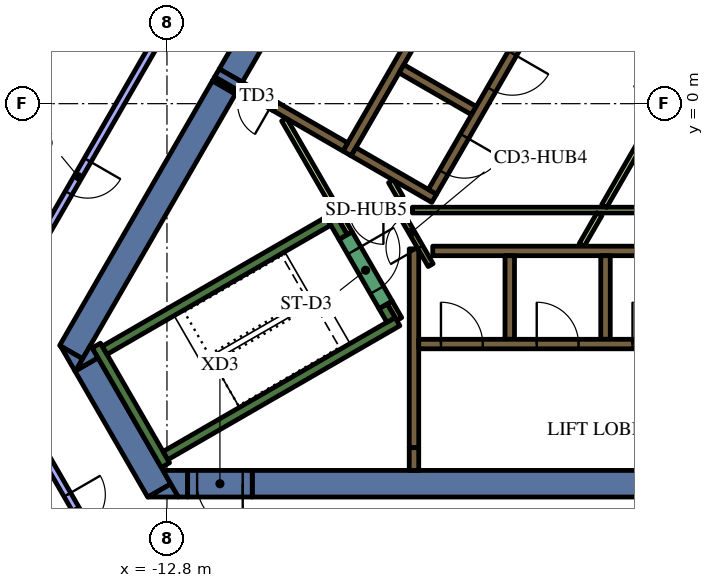
"""IFC4 building model, lengths in metres.
Left out: names, types, materials, properties, quantities, classifications, styles, units other than length and angle.
Written with IfcOpenShell. Run it as: python <this file> out.ifc"""

import sys

from ifc_helpers import new_model, si_unit, direction, frame, frame_2d, origin, place, context, subcontext, project, spatial, polyline, rectangle, outline, extrude, element, fill, save


model = new_model("IFC4")
c1 = context("Model", 3, precision=1e-05, world=origin(), true_north=direction((0.0, 1.0)))
c2 = subcontext(c1, "Body", "Model", "MODEL_VIEW")
j1 = project(units=[si_unit("LENGTHUNIT", "METRE"), si_unit("PLANEANGLEUNIT", "RADIAN")], contexts=[c1])
p1 = place(None, origin())
s1 = spatial("IfcSite", under=j1, at=p1, CompositionType="ELEMENT")
p2 = place(p1, origin())
s2 = spatial("IfcBuilding", under=s1, at=p2, CompositionType="ELEMENT")
p3 = place(p2, frame((0.0, 0.0, 214.2)))
s3 = spatial("IfcBuildingStorey", under=s2, at=p3, CompositionType="ELEMENT", Elevation=214.2)
p4 = place(p3, frame((-11.301, 0.426, 0.0), z_axis=(0.0, 0.0, 1.0), x_axis=(0.50111559984, 0.865380353138, 0.0)))
e1 = element("IfcWall", 1, at=p4, inside=s3, PredefinedType="SOLIDWALL", context=c2, shape_type="SweptSolid", body=[
    extrude(rectangle(XDim=0.121, YDim=0.7, at=frame_2d((0.061, 0.0))), origin(), (0.0, 0.0, 1.0), 4.2),
])
p5 = place(p3, frame((-15.321, -6.537, 0.0), z_axis=(0.0, 0.0, 1.0), x_axis=(0.500000268222, 0.866025248926, 0.0)))
e2 = element("IfcWall", 2, at=p5, inside=s3, PredefinedType="SOLIDWALL", context=c2, shape_type="SweptSolid", body=[
    extrude(rectangle(XDim=8.038, YDim=0.7, at=frame_2d((4.019, 0.0))), origin(), (0.0, 0.0, 1.0), 4.2),
])
p6 = place(p3, origin())
e3 = element("IfcWall", 3, at=p6, inside=s3, PredefinedType="SOLIDWALL", context=c2, shape_type="SweptSolid", body=[
    extrude(outline(polyline([(-15.213, -7.05), (-15.601, -6.378), (-15.019, -6.714), (-15.213, -7.05)])), origin(), (0.0, 0.0, 1.0), 4.2),
])
p7 = place(p3, frame((-4.696, 11.867, 0.0), z_axis=(0.0, 0.0, 1.0), x_axis=(-0.500003726532, -0.866023252259, 0.0)))
e4 = element("IfcWall", 4, at=p7, inside=s3, PredefinedType="SOLIDWALL", context=c2, shape_type="SweptSolid", body=[
    extrude(rectangle(XDim=12.848, YDim=0.7, at=frame_2d((6.424, 0.0))), origin(), (0.0, 0.0, 1.0), 4.2),
])
e5 = element("IfcWall", 5, at=p6, inside=s3, PredefinedType="SOLIDWALL", context=c2, shape_type="SweptSolid", body=[
    extrude(outline(polyline([(-11.543, 0.708), (-11.424, 0.914), (-10.843, 0.578), (-10.962, 0.372), (-11.543, 0.708)])), origin(), (0.0, 0.0, 1.0), 4.2),
])
p8 = place(p3, frame((-14.917, -6.863, 0.0), z_axis=(0.0, 0.0, 1.0), x_axis=(0.499972675833, -0.866041178825, 0.0)))
e6 = element("IfcWall", 6, at=p8, inside=s3, PredefinedType="SOLIDWALL", context=c2, shape_type="SweptSolid", body=[
    extrude(rectangle(XDim=3.829, YDim=0.7, at=frame_2d((1.915, 0.0))), origin(), (0.0, 0.0, 1.0), 4.2),
])
e7 = element("IfcWall", 7, at=p6, inside=s3, PredefinedType="SOLIDWALL", context=c2, shape_type="SweptSolid", body=[
    extrude(outline(polyline([(-14.809, -6.35), (-14.615, -6.686), (-15.197, -7.022), (-14.809, -6.35)])), origin(), (0.0, 0.0, 1.0), 4.2),
])
e8 = element("IfcWall", 8, at=p6, inside=s3, PredefinedType="SOLIDWALL", context=c2, shape_type="SweptSolid", body=[
    extrude(outline(polyline([(-12.5, -10.35), (-13.296, -10.35), (-12.698, -10.005), (-12.5, -10.35)])), origin(), (0.0, 0.0, 1.0), 4.2),
])
e9 = element("IfcWall", 9, at=p6, inside=s3, PredefinedType="SOLIDWALL", context=c2, shape_type="SweptSolid", body=[
    extrude(outline(polyline([(-12.257, -10.35), (-12.5, -10.35), (-12.904, -9.65), (-12.257, -9.65), (-12.257, -10.35)])), origin(), (0.0, 0.0, 1.0), 4.2),
])
p9 = place(p3, frame((-10.556, -10.0, 0.0), z_axis=(0.0, 0.0, 1.0), x_axis=(1.0, 0.0, 0.0)))
e10 = element("IfcWall", 10, at=p9, inside=s3, PredefinedType="SOLIDWALL", context=c2, shape_type="SweptSolid", body=[
    extrude(rectangle(XDim=19.461, YDim=0.7, at=frame_2d((9.73, 0.0))), origin(), (0.0, 0.0, 1.0), 4.2),
])
p10 = place(p3, frame((-12.84, -9.511, 0.0), z_axis=(0.0, 0.0, 1.0), x_axis=(-0.500048121057, 0.865997619297, 0.0)))
e11 = element("IfcWall", 11, at=p10, inside=s3, PredefinedType="SOLIDWALL", context=c2, shape_type="SweptSolid", body=[
    extrude(rectangle(XDim=3.634, YDim=0.25, at=frame_2d((1.817, 0.0))), origin(), (0.0, 0.0, 1.0), 4.2),
])
p11 = place(p3, frame((-14.44, -6.49, 0.0), z_axis=(0.0, 0.0, 1.0), x_axis=(0.866022966069, 0.500004222222, 0.0)))
e12 = element("IfcWall", 12, at=p11, inside=s3, PredefinedType="SOLIDWALL", context=c2, shape_type="SweptSolid", body=[
    extrude(rectangle(XDim=6.8, YDim=0.25, at=frame_2d((3.4, 0.0))), origin(), (0.0, 0.0, 1.0), 4.2),
])
p12 = place(p3, frame((-8.163, -3.511, 0.0), z_axis=(0.0, 0.0, 1.0), x_axis=(-0.499994068514, 0.866028828302, 0.0)))
e13 = element("IfcWall", 13, at=p12, inside=s3, PredefinedType="SOLIDWALL", context=c2, shape_type="SweptSolid", body=[
    extrude(rectangle(XDim=0.674, YDim=0.25, at=frame_2d((0.337, 0.0))), origin(), (0.0, 0.0, 1.0), 4.2),
])
p13 = place(p3, frame((-12.84, -9.261, 0.0), z_axis=(0.0, 0.0, 1.0), x_axis=(0.866016039709, 0.500016218704, 0.0)))
e14 = element("IfcWall", 14, at=p13, inside=s3, PredefinedType="SOLIDWALL", context=c2, shape_type="SweptSolid", body=[
    extrude(rectangle(XDim=7.05, YDim=0.25, at=frame_2d((3.525, 0.0))), origin(), (0.0, 0.0, 1.0), 4.2),
])
p14 = place(p3, frame((-6.905, -5.69, 0.0), z_axis=(0.0, 0.0, 1.0), x_axis=(-0.499993700073, 0.866029041019, 0.0)))
e15 = element("IfcWall", 15, at=p14, inside=s3, PredefinedType="SOLIDWALL", context=c2, shape_type="SweptSolid", body=[
    extrude(rectangle(XDim=0.416, YDim=0.25, at=frame_2d((0.208, 0.0))), origin(), (0.0, 0.0, 1.0), 4.2),
])
p15 = place(p3, frame((-6.3, -9.05, 0.0), z_axis=(0.0, 0.0, 1.0), x_axis=(0.0, 1.0, 0.0)))
e16 = element("IfcWall", 16, at=p15, inside=s3, PredefinedType="SOLIDWALL", context=c2, shape_type="SweptSolid", body=[
    extrude(rectangle(XDim=5.23, YDim=0.25, at=frame_2d((2.615, 0.0))), origin(), (0.0, 0.0, 1.0), 4.2),
])
p16 = place(p3, frame((-6.3, -9.052, 0.0), z_axis=(0.0, 0.0, 1.0), x_axis=(0.0, -1.0, 0.0)))
e17 = element("IfcWall", 17, at=p16, inside=s3, PredefinedType="SOLIDWALL", context=c2, shape_type="SweptSolid", body=[
    extrude(rectangle(XDim=0.598, YDim=0.25, at=frame_2d((0.299, 0.0))), origin(), (0.0, 0.0, 1.0), 4.2),
])
p17 = place(p3, frame((-5.806, -3.875, 0.0), z_axis=(0.0, 0.0, 1.0), x_axis=(1.0, 0.0, 0.0)))
e18 = element("IfcWall", 18, at=p17, inside=s3, PredefinedType="SOLIDWALL", context=c2, shape_type="SweptSolid", body=[
    extrude(rectangle(XDim=12.231, YDim=0.25, at=frame_2d((6.116, 0.0))), origin(), (0.0, 0.0, 1.0), 4.2),
])
for number, where, z_axis, x_axis in (
    (19, (-1.26, -4.0, 0.0), (0.0, 0.0, 1.0), (0.0, -1.0, 0.0)),
    (20, (-3.78, -4.0, 0.0), (0.0, 0.0, 1.0), (0.0, -1.0, 0.0)),
):
    element("IfcWall", number, at=place(p3, frame(where, z_axis=z_axis, x_axis=x_axis)), inside=s3, PredefinedType="SOLIDWALL", context=c2, shape_type="SweptSolid", body=[
        extrude(rectangle(XDim=2.2, YDim=0.25, at=frame_2d((1.1, 0.0))), origin(), (0.0, 0.0, 1.0), 4.2),
    ])
p18 = place(p3, frame((-8.06, -1.311, 0.0), z_axis=(0.0, 0.0, 1.0), x_axis=(0.50000273126, 0.866023826885, 0.0)))
e21 = element("IfcWall", 21, at=p18, inside=s3, PredefinedType="SOLIDWALL", context=c2, shape_type="SweptSolid", body=[
    extrude(rectangle(XDim=10.33, YDim=0.25, at=frame_2d((5.165, 0.0))), origin(), (0.0, 0.0, 1.0), 4.2),
])
p19 = place(p3, frame((-4.724, -0.182, 0.0), z_axis=(0.0, 0.0, 1.0), x_axis=(-0.866008176907, 0.50002983664, 0.0)))
e22 = element("IfcWall", 22, at=p19, inside=s3, PredefinedType="SOLIDWALL", context=c2, shape_type="SweptSolid", body=[
    extrude(rectangle(XDim=2.2, YDim=0.25, at=frame_2d((1.1, 0.0))), origin(), (0.0, 0.0, 1.0), 4.2),
])
p20 = place(p3, frame((-7.889, -1.265, 0.0), z_axis=(0.0, 0.0, 1.0), x_axis=(0.866057815567, -0.499943856944, 0.0)))
e23 = element("IfcWall", 23, at=p20, inside=s3, PredefinedType="SOLIDWALL", context=c2, shape_type="SweptSolid", body=[
    extrude(rectangle(XDim=2.45, YDim=0.25, at=frame_2d((1.225, 0.0))), origin(), (0.0, 0.0, 1.0), 4.2),
])
p21 = place(p3, frame((-9.95, -0.075, 0.0), z_axis=(0.0, 0.0, 1.0), x_axis=(0.865962177421, -0.500109495288, 0.0)))
e24 = element("IfcWall", 24, at=p21, inside=s3, PredefinedType="SOLIDWALL", context=c2, shape_type="SweptSolid", body=[
    extrude(rectangle(XDim=2.129, YDim=0.25, at=frame_2d((1.065, 0.0))), origin(), (0.0, 0.0, 1.0), 4.2),
])
p22 = place(p3, frame((-9.718, -0.417, 0.0), z_axis=(0.0, 0.0, 1.0), x_axis=(0.499966538646, -0.866044721844, 0.0)))
e25 = element("IfcWall", 25, at=p22, inside=s3, PredefinedType="PARTITIONING", context=c2, shape_type="SweptSolid", body=[
    extrude(rectangle(XDim=2.511, YDim=0.15, at=frame_2d((1.255, 0.0))), origin(), (0.0, 0.0, 1.0), 3.45),
])
p23 = place(p3, frame((1.438, -2.8, 0.0), z_axis=(0.0, 0.0, 1.0), x_axis=(-1.0, 0.0, 0.0)))
e26 = element("IfcWall", 26, at=p23, inside=s3, PredefinedType="PARTITIONING", context=c2, shape_type="SweptSolid", body=[
    extrude(rectangle(XDim=7.781, YDim=0.15, at=frame_2d((3.891, 0.0))), origin(), (0.0, 0.0, 1.0), 3.45),
])
p24 = place(p3, frame((-1.418, -2.907, 0.0), z_axis=(0.0, 0.0, 1.0), x_axis=(-0.499978056798, -0.866038072327, 0.0)))
e27 = element("IfcWall", 27, at=p24, inside=s3, PredefinedType="PARTITIONING", context=c2, shape_type="SweptSolid", body=[
    extrude(rectangle(XDim=0.937, YDim=0.15, at=frame_2d((0.469, 0.0))), origin(), (0.0, 0.0, 1.0), 3.45),
])
p25 = place(p3, frame((-1.295, -2.693, 0.0), z_axis=(0.0, 0.0, 1.0), x_axis=(0.500030943131, 0.866007538022, 0.0)))
e28 = element("IfcWall", 28, at=p25, inside=s3, PredefinedType="PARTITIONING", context=c2, shape_type="SweptSolid", body=[
    extrude(rectangle(XDim=2.672, YDim=0.15, at=frame_2d((1.336, 0.0))), origin(), (0.0, 0.0, 1.0), 3.45),
])
p26 = place(p3, frame((-6.653, -2.477, 0.0), z_axis=(0.0, 0.0, 1.0), x_axis=(-0.500002592159, 0.866023907196, 0.0)))
e29 = element("IfcWall", 29, at=p26, inside=s3, PredefinedType="PARTITIONING", context=c2, shape_type="SweptSolid", body=[
    extrude(rectangle(XDim=0.503, YDim=0.15, at=frame_2d((0.251, 0.0))), origin(), (0.0, 0.0, 1.0), 3.45),
])
p27 = place(p3, frame((-7.99, -3.412, 0.0), z_axis=(0.0, 0.0, 1.0), x_axis=(-0.499858525911, 0.866107068482, 0.0)))
e30 = element("IfcWall", 30, at=p27, inside=s3, PredefinedType="PARTITIONING", context=c2, shape_type="SweptSolid", body=[
    extrude(rectangle(XDim=0.466, YDim=0.15, at=frame_2d((0.233, 0.0))), origin(), (0.0, 0.0, 1.0), 3.45),
])
p28 = place(p3, frame((-6.94, -5.23, 0.0), z_axis=(0.0, 0.0, 1.0), x_axis=(0.499834152157, -0.86612113491, 0.0)))
e31 = element("IfcWall", 31, at=p28, inside=s3, PredefinedType="PARTITIONING", context=c2, shape_type="SweptSolid", body=[
    extrude(rectangle(XDim=0.505, YDim=0.15, at=frame_2d((0.252, 0.0))), origin(), (0.0, 0.0, 1.0), 4.2),
])
p29 = place(p3, frame((-6.175, -6.325, 0.0), z_axis=(0.0, 0.0, 1.0), x_axis=(1.0, 0.0, 0.0)))
e32 = element("IfcWall", 32, at=p29, inside=s3, PredefinedType="SOLIDWALL", context=c2, shape_type="SweptSolid", body=[
    extrude(rectangle(XDim=12.35, YDim=0.25, at=frame_2d((6.175, 0.0))), origin(), (0.0, 0.0, 1.0), 4.2),
])
p30 = place(p29, frame((0.585, 0.0, 0.0)))
e33 = element("IfcOpeningElement", 33, at=p30, cuts=e32, PredefinedType="OPENING", context=c2, shape_type="SweptSolid", body=[
    extrude(rectangle(XDim=1.1, YDim=2.1, at=frame_2d((0.55, 1.05))), frame((0.0, 0.135, 0.0), z_axis=(0.0, -1.0, 0.0), x_axis=(1.0, 0.0, 0.0)), (0.0, 0.0, 1.0), 0.27),
])
p31 = place(p29, frame((3.105, 0.0, 0.0)))
e34 = element("IfcOpeningElement", 34, at=p31, cuts=e32, PredefinedType="OPENING", context=c2, shape_type="SweptSolid", body=[
    extrude(rectangle(XDim=1.1, YDim=2.1, at=frame_2d((0.55, 1.05))), frame((0.0, 0.135, 0.0), z_axis=(0.0, -1.0, 0.0), x_axis=(1.0, 0.0, 0.0)), (0.0, 0.0, 1.0), 0.27),
])
p32 = place(p29, frame((5.625, 0.0, 0.0)))
e35 = element("IfcOpeningElement", 35, at=p32, cuts=e32, PredefinedType="OPENING", context=c2, shape_type="SweptSolid", body=[
    extrude(rectangle(XDim=1.1, YDim=2.1, at=frame_2d((0.55, 1.05))), frame((0.0, 0.135, 0.0), z_axis=(0.0, -1.0, 0.0), x_axis=(1.0, 0.0, 0.0)), (0.0, 0.0, 1.0), 0.27),
])
p33 = place(p29, frame((8.145, 0.0, 0.0)))
e36 = element("IfcOpeningElement", 36, at=p33, cuts=e32, PredefinedType="OPENING", context=c2, shape_type="SweptSolid", body=[
    extrude(rectangle(XDim=1.1, YDim=2.1, at=frame_2d((0.55, 1.05))), frame((0.0, 0.135, 0.0), z_axis=(0.0, -1.0, 0.0), x_axis=(1.0, 0.0, 0.0)), (0.0, 0.0, 1.0), 0.27),
])
p34 = place(p29, frame((10.665, 0.0, 0.0)))
e37 = element("IfcOpeningElement", 37, at=p34, cuts=e32, PredefinedType="OPENING", context=c2, shape_type="SweptSolid", body=[
    extrude(rectangle(XDim=1.1, YDim=2.1, at=frame_2d((0.55, 1.05))), frame((0.0, 0.135, 0.0), z_axis=(0.0, -1.0, 0.0), x_axis=(1.0, 0.0, 0.0)), (0.0, 0.0, 1.0), 0.27),
])
p35 = place(p3, frame((-0.898, 6.194, 0.0), z_axis=(0.0, 0.0, 1.0), x_axis=(-0.499996202215, -0.866027596426, 0.0)))
e38 = element("IfcWall", 38, at=p35, inside=s3, PredefinedType="SOLIDWALL", context=c2, shape_type="SweptSolid", body=[
    extrude(rectangle(XDim=9.83, YDim=0.25, at=frame_2d((4.915, 0.0))), origin(), (0.0, 0.0, 1.0), 4.2),
])
p36 = place(p35, frame((0.585, 0.0, 0.0)))
e39 = element("IfcOpeningElement", 39, at=p36, cuts=e38, PredefinedType="OPENING", context=c2, shape_type="SweptSolid", body=[
    extrude(rectangle(XDim=1.1, YDim=2.1, at=frame_2d((0.55, 1.05))), frame((0.0, 0.135, 0.0), z_axis=(0.0, -1.0, 0.0), x_axis=(1.0, 0.0, 0.0)), (0.0, 0.0, 1.0), 0.27),
])
p37 = place(p35, frame((3.105, 0.0, 0.0)))
e40 = element("IfcOpeningElement", 40, at=p37, cuts=e38, PredefinedType="OPENING", context=c2, shape_type="SweptSolid", body=[
    extrude(rectangle(XDim=1.1, YDim=2.1, at=frame_2d((0.55, 1.05))), frame((0.0, 0.135, 0.0), z_axis=(0.0, -1.0, 0.0), x_axis=(1.0, 0.0, 0.0)), (0.0, 0.0, 1.0), 0.27),
])
p38 = place(p35, frame((5.625, 0.0, 0.0)))
e41 = element("IfcOpeningElement", 41, at=p38, cuts=e38, PredefinedType="OPENING", context=c2, shape_type="SweptSolid", body=[
    extrude(rectangle(XDim=1.1, YDim=2.1, at=frame_2d((0.55, 1.05))), frame((0.0, 0.135, 0.0), z_axis=(0.0, -1.0, 0.0), x_axis=(1.0, 0.0, 0.0)), (0.0, 0.0, 1.0), 0.27),
])
p39 = place(p35, frame((8.145, 0.0, 0.0)))
e42 = element("IfcOpeningElement", 42, at=p39, cuts=e38, PredefinedType="OPENING", context=c2, shape_type="SweptSolid", body=[
    extrude(rectangle(XDim=1.1, YDim=2.1, at=frame_2d((0.55, 1.05))), frame((0.0, 0.135, 0.0), z_axis=(0.0, -1.0, 0.0), x_axis=(1.0, 0.0, 0.0)), (0.0, 0.0, 1.0), 0.27),
])
p40 = place(p3, frame((-8.098, -3.474, 0.0), z_axis=(0.0, 0.0, 1.0), x_axis=(0.49994051562, -0.866059744384, 0.0)))
e43 = element("IfcWall", 43, at=p40, inside=s3, PredefinedType="SOLIDWALL", context=c2, shape_type="SweptSolid", body=[
    extrude(rectangle(XDim=2.1, YDim=0.4, at=frame_2d((1.05, 0.0))), origin(), (0.0, 0.0, 1.0), 4.2),
])
p41 = place(p40, frame((0.45, 0.0, 0.0)))
e44 = element("IfcOpeningElement", 44, at=p41, cuts=e43, PredefinedType="OPENING", context=c2, shape_type="SweptSolid", body=[
    extrude(rectangle(XDim=1.2, YDim=2.1, at=frame_2d((0.6, 1.05))), frame((0.0, 0.21, 0.0), z_axis=(0.0, -1.0, 0.0), x_axis=(1.0, 0.0, 0.0)), (0.0, 0.0, 1.0), 0.42),
])
p42 = place(p3, frame((-5.861, -4.248, 0.0), z_axis=(0.0, 0.0, 1.0), x_axis=(-0.500043646338, 0.866000203093, 0.0)))
e45 = element("IfcWall", 45, at=p42, inside=s3, PredefinedType="PARTITIONING", context=c2, shape_type="SweptSolid", body=[
    extrude(rectangle(XDim=1.93, YDim=0.15, at=frame_2d((0.965, 0.0))), origin(), (0.0, 0.0, 1.0), 4.2),
])
p43 = place(p42, frame((0.55, 0.0, 0.0)))
e46 = element("IfcOpeningElement", 46, at=p43, cuts=e45, PredefinedType="OPENING", context=c2, shape_type="SweptSolid", body=[
    extrude(rectangle(XDim=0.9, YDim=2.1, at=frame_2d((0.45, 1.05))), frame((0.0, 0.085, 0.0), z_axis=(0.0, -1.0, 0.0), x_axis=(1.0, 0.0, 0.0)), (0.0, 0.0, 1.0), 0.17),
])
p44 = place(p3, frame((-10.556, -10.0, 0.0), z_axis=(0.0, 0.0, 1.0), x_axis=(-1.0, 0.0, 0.0)))
e47 = element("IfcWall", 47, at=p44, inside=s3, PredefinedType="SOLIDWALL", context=c2, shape_type="SweptSolid", body=[
    extrude(rectangle(XDim=1.7, YDim=0.7, at=frame_2d((0.85, 0.0))), origin(), (0.0, 0.0, 1.0), 4.2),
])
p45 = place(p44, frame((0.25, 0.0, 0.0)))
e48 = element("IfcOpeningElement", 48, at=p45, cuts=e47, PredefinedType="OPENING", context=c2, shape_type="SweptSolid", body=[
    extrude(rectangle(XDim=1.2, YDim=2.1, at=frame_2d((0.6, 1.05))), frame((0.0, 0.36, 0.0), z_axis=(0.0, -1.0, 0.0), x_axis=(1.0, 0.0, 0.0)), (0.0, 0.0, 1.0), 0.72),
])
p46 = place(p3, frame((-6.655, -2.8, 0.0), z_axis=(0.0, 0.0, 1.0), x_axis=(-1.0, 0.0, 0.0)))
e49 = element("IfcWall", 49, at=p46, inside=s3, PredefinedType="PARTITIONING", context=c2, shape_type="SweptSolid", body=[
    extrude(rectangle(XDim=1.8, YDim=0.15, at=frame_2d((0.9, 0.0))), origin(), (0.0, 0.0, 1.0), 3.45),
])
p47 = place(p46, frame((0.45, 0.0, 0.0)))
e50 = element("IfcOpeningElement", 50, at=p47, cuts=e49, PredefinedType="OPENING", context=c2, shape_type="SweptSolid", body=[
    extrude(rectangle(XDim=0.9, YDim=2.1, at=frame_2d((0.45, 1.05))), frame((0.0, 0.085, 0.0), z_axis=(0.0, -1.0, 0.0), x_axis=(1.0, 0.0, 0.0)), (0.0, 0.0, 1.0), 0.17),
])
p48 = place(p3, frame((-9.95, -0.075, 0.0), z_axis=(0.0, 0.0, 1.0), x_axis=(-0.865952669392, 0.500125958508, 0.0)))
e51 = element("IfcWall", 51, at=p48, inside=s3, PredefinedType="SOLIDWALL", context=c2, shape_type="SweptSolid", body=[
    extrude(rectangle(XDim=1.1, YDim=0.25, at=frame_2d((0.55, 0.0))), origin(), (0.0, 0.0, 1.0), 4.2),
])
p49 = place(p48, frame((0.1, 0.0, 0.0)))
e52 = element("IfcOpeningElement", 52, at=p49, cuts=e51, PredefinedType="OPENING", context=c2, shape_type="SweptSolid", body=[
    extrude(rectangle(XDim=0.9, YDim=2.1, at=frame_2d((0.45, 1.05))), frame((0.0, 0.135, 0.0), z_axis=(0.0, -1.0, 0.0), x_axis=(1.0, 0.0, 0.0)), (0.0, 0.0, 1.0), 0.27),
])
p50 = place(p3, frame((-12.537, 2.585, 0.0), z_axis=(0.0, 0.0, 1.0), x_axis=(-0.500002393198, -0.866024022066, 0.0)))
e53 = element("IfcWall", 53, at=p50, inside=s3, PredefinedType="PARTITIONING", context=c2, shape_type="SweptSolid", body=[
    extrude(rectangle(XDim=10.317, YDim=0.2, at=frame_2d((5.159, 0.0))), origin(), (0.0, 0.0, 1.0), 3.45),
])
p51 = place(p50, frame((4.7, 0.0, 0.0)))
e54 = element("IfcOpeningElement", 54, at=p51, cuts=e53, PredefinedType="OPENING", context=c2, shape_type="SweptSolid", body=[
    extrude(rectangle(XDim=1.0, YDim=2.1, at=frame_2d((0.5, 1.05))), frame((0.0, 0.11, 0.0), z_axis=(0.0, -1.0, 0.0), x_axis=(1.0, 0.0, 0.0)), (0.0, 0.0, 1.0), 0.22),
])
p52 = place(p3, frame((-15.971, -9.337, 0.0), z_axis=(0.0, 0.0, 1.0), x_axis=(0.500010870188, -0.866019127788, 0.0)))
e55 = element("IfcWall", 55, at=p52, inside=s3, PredefinedType="PARTITIONING", context=c2, shape_type="SweptSolid", body=[
    extrude(rectangle(XDim=3.249, YDim=0.2, at=frame_2d((1.624, 0.0))), origin(), (0.0, 0.0, 1.0), 3.45),
])
p53 = place(p52, frame((1.1, 0.0, 0.0)))
e56 = element("IfcOpeningElement", 56, at=p53, cuts=e55, PredefinedType="OPENING", context=c2, shape_type="SweptSolid", body=[
    extrude(rectangle(XDim=1.0, YDim=2.1, at=frame_2d((0.5, 1.05))), frame((0.0, 0.11, 0.0), z_axis=(0.0, -1.0, 0.0), x_axis=(1.0, 0.0, 0.0)), (0.0, 0.0, 1.0), 0.22),
])
p54 = place(p30, origin())
e57 = element("IfcDoor", 57, at=p54, inside=s3, OperationType="DOUBLE_DOOR_SLIDING", PredefinedType="DOOR", context=c2, shape_type="SweptSolid", body=[
    extrude(rectangle(XDim=1.1, YDim=2.1, at=frame_2d((0.55, 1.05))), frame((0.0, 0.025, 0.0), z_axis=(0.0, -1.0, 0.0), x_axis=(1.0, 0.0, 0.0)), (0.0, 0.0, 1.0), 0.05),
])
fill(e33, e57)
p55 = place(p31, origin())
e58 = element("IfcDoor", 58, at=p55, inside=s3, OperationType="DOUBLE_DOOR_SLIDING", PredefinedType="DOOR", context=c2, shape_type="SweptSolid", body=[
    extrude(rectangle(XDim=1.1, YDim=2.1, at=frame_2d((0.55, 1.05))), frame((0.0, 0.025, 0.0), z_axis=(0.0, -1.0, 0.0), x_axis=(1.0, 0.0, 0.0)), (0.0, 0.0, 1.0), 0.05),
])
fill(e34, e58)
p56 = place(p32, origin())
e59 = element("IfcDoor", 59, at=p56, inside=s3, OperationType="DOUBLE_DOOR_SLIDING", PredefinedType="DOOR", context=c2, shape_type="SweptSolid", body=[
    extrude(rectangle(XDim=1.1, YDim=2.1, at=frame_2d((0.55, 1.05))), frame((0.0, 0.025, 0.0), z_axis=(0.0, -1.0, 0.0), x_axis=(1.0, 0.0, 0.0)), (0.0, 0.0, 1.0), 0.05),
])
fill(e35, e59)
p57 = place(p38, origin())
e60 = element("IfcDoor", 60, at=p57, inside=s3, OperationType="DOUBLE_DOOR_SLIDING", PredefinedType="DOOR", context=c2, shape_type="SweptSolid", body=[
    extrude(rectangle(XDim=1.1, YDim=2.1, at=frame_2d((0.55, 1.05))), frame((0.0, 0.025, 0.0), z_axis=(0.0, -1.0, 0.0), x_axis=(1.0, 0.0, 0.0)), (0.0, 0.0, 1.0), 0.05),
])
fill(e41, e60)
p58 = place(p39, origin())
e61 = element("IfcDoor", 61, at=p58, inside=s3, OperationType="DOUBLE_DOOR_SLIDING", PredefinedType="DOOR", context=c2, shape_type="SweptSolid", body=[
    extrude(rectangle(XDim=1.1, YDim=2.1, at=frame_2d((0.55, 1.05))), frame((0.0, 0.025, 0.0), z_axis=(0.0, -1.0, 0.0), x_axis=(1.0, 0.0, 0.0)), (0.0, 0.0, 1.0), 0.05),
])
fill(e42, e61)
p59 = place(p41, origin())
e62 = element("IfcDoor", 62, at=p59, inside=s3, OperationType="SINGLE_SWING_LEFT", PredefinedType="DOOR", context=c2, shape_type="SweptSolid", body=[
    extrude(rectangle(XDim=1.2, YDim=2.1, at=frame_2d((0.6, 1.05))), frame((0.0, 0.025, 0.0), z_axis=(0.0, -1.0, 0.0), x_axis=(1.0, 0.0, 0.0)), (0.0, 0.0, 1.0), 0.05),
])
fill(e44, e62)
p60 = place(p43, origin())
e63 = element("IfcDoor", 63, at=p60, inside=s3, OperationType="SINGLE_SWING_LEFT", PredefinedType="DOOR", context=c2, shape_type="SweptSolid", body=[
    extrude(rectangle(XDim=0.9, YDim=2.1, at=frame_2d((0.45, 1.05))), frame((0.0, 0.025, 0.0), z_axis=(0.0, -1.0, 0.0), x_axis=(1.0, 0.0, 0.0)), (0.0, 0.0, 1.0), 0.05),
])
fill(e46, e63)
p61 = place(p45, origin())
e64 = element("IfcDoor", 64, at=p61, inside=s3, OperationType="SINGLE_SWING_LEFT", PredefinedType="DOOR", context=c2, shape_type="SweptSolid", body=[
    extrude(rectangle(XDim=1.2, YDim=2.1, at=frame_2d((0.6, 1.05))), frame((0.0, 0.025, 0.0), z_axis=(0.0, -1.0, 0.0), x_axis=(1.0, 0.0, 0.0)), (0.0, 0.0, 1.0), 0.05),
])
fill(e48, e64)
p62 = place(p47, origin())
e65 = element("IfcDoor", 65, at=p62, inside=s3, OperationType="SINGLE_SWING_LEFT", PredefinedType="DOOR", context=c2, shape_type="SweptSolid", body=[
    extrude(rectangle(XDim=0.9, YDim=2.1, at=frame_2d((0.45, 1.05))), frame((0.0, 0.025, 0.0), z_axis=(0.0, -1.0, 0.0), x_axis=(1.0, 0.0, 0.0)), (0.0, 0.0, 1.0), 0.05),
])
fill(e50, e65)
p63 = place(p49, origin())
e66 = element("IfcDoor", 66, at=p63, inside=s3, OperationType="SINGLE_SWING_LEFT", PredefinedType="DOOR", context=c2, shape_type="SweptSolid", body=[
    extrude(rectangle(XDim=0.9, YDim=2.1, at=frame_2d((0.45, 1.05))), frame((0.0, 0.025, 0.0), z_axis=(0.0, -1.0, 0.0), x_axis=(1.0, 0.0, 0.0)), (0.0, 0.0, 1.0), 0.05),
])
fill(e52, e66)
p64 = place(p51, origin())
e67 = element("IfcDoor", 67, at=p64, inside=s3, OperationType="SINGLE_SWING_RIGHT", PredefinedType="DOOR", context=c2, shape_type="SweptSolid", body=[
    extrude(rectangle(XDim=1.0, YDim=2.1, at=frame_2d((0.5, 1.05))), frame((0.0, 0.025, 0.0), z_axis=(0.0, -1.0, 0.0), x_axis=(1.0, 0.0, 0.0)), (0.0, 0.0, 1.0), 0.05),
])
fill(e54, e67)
p65 = place(p53, origin())
e68 = element("IfcDoor", 68, at=p65, inside=s3, OperationType="SINGLE_SWING_LEFT", PredefinedType="DOOR", context=c2, shape_type="SweptSolid", body=[
    extrude(rectangle(XDim=1.0, YDim=2.1, at=frame_2d((0.5, 1.05))), frame((0.0, 0.025, 0.0), z_axis=(0.0, -1.0, 0.0), x_axis=(1.0, 0.0, 0.0)), (0.0, 0.0, 1.0), 0.05),
])
fill(e56, e68)
save(model, sys.argv[1])
